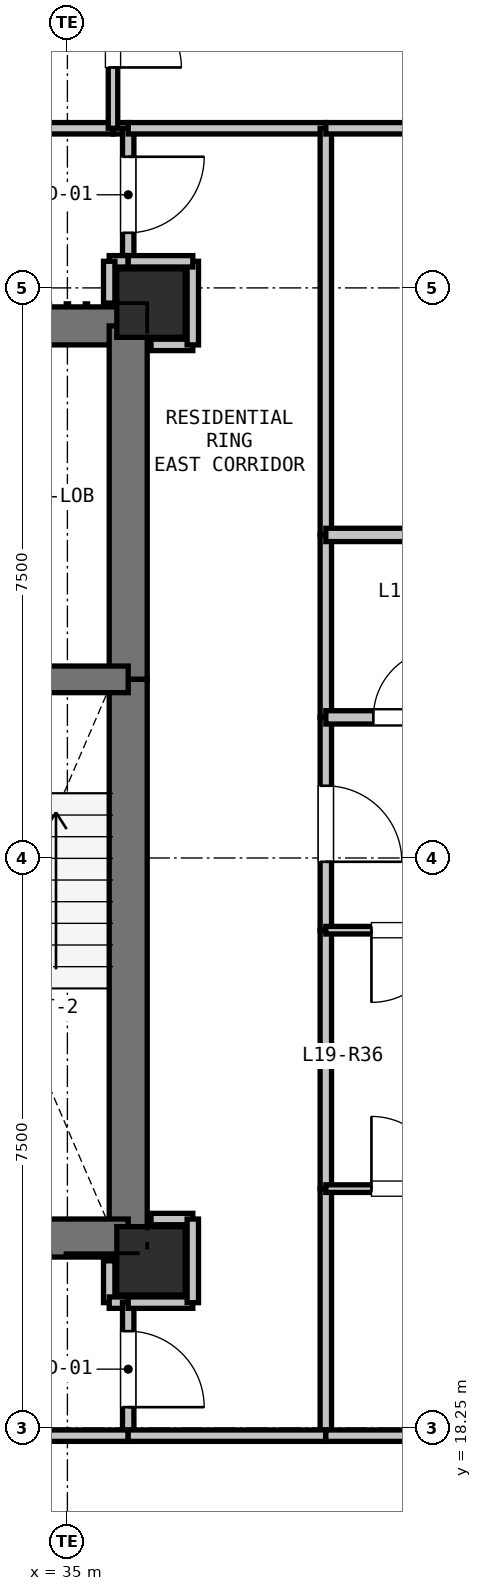
"""IFC4 building model, lengths in metres.
Left out: names, types, materials, properties, quantities, classifications, styles, units other than length and angle.
Written with IfcOpenShell. Run it as: python <this file> out.ifc"""

import sys

from ifc_helpers import new_model, si_unit, direction, frame, frame_2d, origin, origin_2d, place, context, subcontext, project, spatial, rectangle, extrude, element, fill, save


model = new_model("IFC4")
c1 = context("Model", 3, precision=1e-05, world=origin(), true_north=direction((0.0, 1.0)))
c2 = subcontext(c1, "Body", "Model", "MODEL_VIEW")
j1 = project(units=[si_unit("LENGTHUNIT", "METRE"), si_unit("PLANEANGLEUNIT", "RADIAN")], contexts=[c1])
p1 = place(None, origin())
s1 = spatial("IfcSite", under=j1, at=p1, CompositionType="ELEMENT")
p2 = place(p1, origin())
s2 = spatial("IfcBuilding", under=s1, at=p2, CompositionType="ELEMENT")
p3 = place(p2, frame((0.0, 0.0, 73.5)))
s3 = spatial("IfcBuildingStorey", under=s2, at=p3, CompositionType="ELEMENT", Elevation=73.5)
for number, where, z_axis, x_axis in (
    (1, (36.1, 33.05, 0.0), (0.0, 0.0, 1.0), (1.0, 0.0, 0.0)),
    (2, (36.1, 20.45, 0.0), (0.0, 0.0, 1.0), (1.0, 0.0, 0.0)),
):
    element("IfcColumn", number, at=place(p3, frame(where, z_axis=z_axis, x_axis=x_axis)), inside=s3, PredefinedType="COLUMN", context=c2, shape_type="SweptSolid", body=[
        extrude(rectangle(XDim=0.9, YDim=0.9, at=origin_2d()), origin(), (0.0, 0.0, 1.0), 3.3),
    ])
p4 = place(p3, frame((32.35, 32.75, 0.0), z_axis=(0.0, 0.0, 1.0), x_axis=(1.0, 0.0, 0.0)))
e3 = element("IfcWall", 3, at=p4, inside=s3, PredefinedType="SHEAR", context=c2, shape_type="SweptSolid", body=[
    extrude(rectangle(XDim=3.45, YDim=0.5, at=frame_2d((1.725, 0.0))), origin(), (0.0, 0.0, 1.0), 3.05),
])
p5 = place(p4, frame((0.65, 0.0, 0.0)))
e4 = element("IfcOpeningElement", 4, at=p5, cuts=e3, PredefinedType="OPENING", context=c2, shape_type="SweptSolid", body=[
    extrude(rectangle(XDim=1.15, YDim=2.15, at=frame_2d((0.575, 1.075))), frame((0.0, 0.26, 0.0), z_axis=(0.0, -1.0, 0.0), x_axis=(1.0, 0.0, 0.0)), (0.0, 0.0, 1.0), 0.52),
])
p6 = place(p3, frame((35.8, 32.75, 0.0), z_axis=(0.0, 0.0, 1.0), x_axis=(0.0, -1.0, 0.0)))
e5 = element("IfcWall", 5, at=p6, inside=s3, PredefinedType="SHEAR", context=c2, shape_type="SweptSolid", body=[
    extrude(rectangle(XDim=4.65, YDim=0.5, at=frame_2d((2.325, 0.0))), origin(), (0.0, 0.0, 1.0), 3.05),
])
p7 = place(p3, frame((35.8, 28.1, 0.0), z_axis=(0.0, 0.0, 1.0), x_axis=(0.0, -1.0, 0.0)))
e6 = element("IfcWall", 6, at=p7, inside=s3, PredefinedType="SHEAR", context=c2, shape_type="SweptSolid", body=[
    extrude(rectangle(XDim=7.35, YDim=0.5, at=frame_2d((3.675, 0.0))), origin(), (0.0, 0.0, 1.0), 3.05),
])
p8 = place(p3, frame((35.8, 20.75, 0.0), z_axis=(0.0, 0.0, 1.0), x_axis=(-1.0, 0.0, 0.0)))
e7 = element("IfcWall", 7, at=p8, inside=s3, PredefinedType="SHEAR", context=c2, shape_type="SweptSolid", body=[
    extrude(rectangle(XDim=3.45, YDim=0.5, at=frame_2d((1.725, 0.0))), origin(), (0.0, 0.0, 1.0), 3.05),
])
p9 = place(p3, frame((32.35, 28.1, 0.0), z_axis=(0.0, 0.0, 1.0), x_axis=(1.0, 0.0, 0.0)))
e8 = element("IfcWall", 8, at=p9, inside=s3, PredefinedType="SHEAR", context=c2, shape_type="SweptSolid", body=[
    extrude(rectangle(XDim=3.45, YDim=0.35, at=frame_2d((1.725, 0.0))), origin(), (0.0, 0.0, 1.0), 3.05),
])
p10 = place(p9, frame((1.15, 0.0, 0.0)))
e9 = element("IfcOpeningElement", 9, at=p10, cuts=e8, PredefinedType="OPENING", context=c2, shape_type="SweptSolid", body=[
    extrude(rectangle(XDim=1.15, YDim=2.15, at=frame_2d((0.575, 1.075))), frame((0.0, 0.185, 0.0), z_axis=(0.0, -1.0, 0.0), x_axis=(1.0, 0.0, 0.0)), (0.0, 0.0, 1.0), 0.37),
])
p11 = place(p3, frame((35.55, 20.45, 0.0), z_axis=(0.0, 0.0, 1.0), x_axis=(0.0, -1.0, 0.0)))
e10 = element("IfcWall", 10, at=p11, inside=s3, PredefinedType="PARTITIONING", context=c2, shape_type="SweptSolid", body=[
    extrude(rectangle(XDim=0.55, YDim=0.15, at=frame_2d((0.275, 0.0))), origin(), (0.0, 0.0, 1.0), 2.498),
])
p12 = place(p3, frame((35.55, 19.9, 0.0), z_axis=(0.0, 0.0, 1.0), x_axis=(1.0, 0.0, 0.0)))
e11 = element("IfcWall", 11, at=p12, inside=s3, PredefinedType="PARTITIONING", context=c2, shape_type="SweptSolid", body=[
    extrude(rectangle(XDim=0.25, YDim=0.15, at=frame_2d((0.125, 0.0))), origin(), (0.0, 0.0, 1.0), 3.05),
])
p13 = place(p3, frame((35.8, 19.9, 0.0), z_axis=(0.0, 0.0, 1.0), x_axis=(0.0, -1.0, 0.0)))
e12 = element("IfcWall", 12, at=p13, inside=s3, PredefinedType="PARTITIONING", context=c2, shape_type="SweptSolid", body=[
    extrude(rectangle(XDim=1.75, YDim=0.15, at=frame_2d((0.875, 0.0))), origin(), (0.0, 0.0, 1.0), 3.05),
])
p14 = place(p13, frame((0.375, 0.0, 0.0)))
e13 = element("IfcOpeningElement", 13, at=p14, cuts=e12, PredefinedType="OPENING", context=c2, shape_type="SweptSolid", body=[
    extrude(rectangle(XDim=1.0, YDim=2.15, at=frame_2d((0.5, 1.075))), frame((0.0, 0.085, 0.0), z_axis=(0.0, -1.0, 0.0), x_axis=(1.0, 0.0, 0.0)), (0.0, 0.0, 1.0), 0.17),
])
p15 = place(p3, frame((35.8, 18.15, 0.0), z_axis=(0.0, 0.0, 1.0), x_axis=(-1.0, 0.0, 0.0)))
e14 = element("IfcWall", 14, at=p15, inside=s3, PredefinedType="PARTITIONING", context=c2, shape_type="SweptSolid", body=[
    extrude(rectangle(XDim=2.2, YDim=0.15, at=frame_2d((1.1, 0.0))), origin(), (0.0, 0.0, 1.0), 3.05),
])
p16 = place(p3, frame((32.0, 35.35, 0.0), z_axis=(0.0, 0.0, 1.0), x_axis=(1.0, 0.0, 0.0)))
e15 = element("IfcWall", 15, at=p16, inside=s3, PredefinedType="PARTITIONING", context=c2, shape_type="SweptSolid", body=[
    extrude(rectangle(XDim=3.6, YDim=0.15, at=frame_2d((1.8, 0.0))), origin(), (0.0, 0.0, 1.0), 3.05),
])
p17 = place(p3, frame((35.6, 35.35, 0.0), z_axis=(0.0, 0.0, 1.0), x_axis=(1.0, 0.0, 0.0)))
e16 = element("IfcWall", 16, at=p17, inside=s3, PredefinedType="PARTITIONING", context=c2, shape_type="SweptSolid", body=[
    extrude(rectangle(XDim=0.2, YDim=0.15, at=frame_2d((0.1, 0.0))), origin(), (0.0, 0.0, 1.0), 3.05),
])
p18 = place(p3, frame((35.8, 35.35, 0.0), z_axis=(0.0, 0.0, 1.0), x_axis=(0.0, -1.0, 0.0)))
e17 = element("IfcWall", 17, at=p18, inside=s3, PredefinedType="PARTITIONING", context=c2, shape_type="SweptSolid", body=[
    extrude(rectangle(XDim=1.75, YDim=0.15, at=frame_2d((0.875, 0.0))), origin(), (0.0, 0.0, 1.0), 3.05),
])
p19 = place(p18, frame((0.375, 0.0, 0.0)))
e18 = element("IfcOpeningElement", 18, at=p19, cuts=e17, PredefinedType="OPENING", context=c2, shape_type="SweptSolid", body=[
    extrude(rectangle(XDim=1.0, YDim=2.15, at=frame_2d((0.5, 1.075))), frame((0.0, 0.085, 0.0), z_axis=(0.0, -1.0, 0.0), x_axis=(1.0, 0.0, 0.0)), (0.0, 0.0, 1.0), 0.17),
])
p20 = place(p3, frame((35.8, 33.6, 0.0), z_axis=(0.0, 0.0, 1.0), x_axis=(-1.0, 0.0, 0.0)))
e19 = element("IfcWall", 19, at=p20, inside=s3, PredefinedType="PARTITIONING", context=c2, shape_type="SweptSolid", body=[
    extrude(rectangle(XDim=0.25, YDim=0.15, at=frame_2d((0.125, 0.0))), origin(), (0.0, 0.0, 1.0), 3.05),
])
p21 = place(p3, frame((35.55, 33.6, 0.0), z_axis=(0.0, 0.0, 1.0), x_axis=(0.0, -1.0, 0.0)))
e20 = element("IfcWall", 20, at=p21, inside=s3, PredefinedType="PARTITIONING", context=c2, shape_type="SweptSolid", body=[
    extrude(rectangle(XDim=0.55, YDim=0.15, at=frame_2d((0.275, 0.0))), origin(), (0.0, 0.0, 1.0), 2.498),
])
for number, where, z_axis, x_axis in (
    (21, (36.65, 21.0, 0.0), (0.0, 0.0, 1.0), (-1.0, 0.0, 0.0)),
    (22, (36.1, 32.5, 0.0), (0.0, 0.0, 1.0), (1.0, 0.0, 0.0)),
):
    element("IfcWall", number, at=place(p3, frame(where, z_axis=z_axis, x_axis=x_axis)), inside=s3, PredefinedType="PARTITIONING", context=c2, shape_type="SweptSolid", body=[
        extrude(rectangle(XDim=0.55, YDim=0.15, at=frame_2d((0.275, 0.0))), origin(), (0.0, 0.0, 1.0), 2.498),
    ])
p22 = place(p3, frame((36.65, 32.5, 0.0), z_axis=(0.0, 0.0, 1.0), x_axis=(0.0, 1.0, 0.0)))
e23 = element("IfcWall", 23, at=p22, inside=s3, PredefinedType="PARTITIONING", context=c2, shape_type="SweptSolid", body=[
    extrude(rectangle(XDim=1.1, YDim=0.15, at=frame_2d((0.55, 0.0))), origin(), (0.0, 0.0, 1.0), 2.423),
])
p23 = place(p3, frame((36.65, 33.6, 0.0), z_axis=(0.0, 0.0, 1.0), x_axis=(-1.0, 0.0, 0.0)))
e24 = element("IfcWall", 24, at=p23, inside=s3, PredefinedType="PARTITIONING", context=c2, shape_type="SweptSolid", body=[
    extrude(rectangle(XDim=0.85, YDim=0.15, at=frame_2d((0.425, 0.0))), origin(), (0.0, 0.0, 1.0), 2.423),
])
p24 = place(p3, frame((35.8, 35.35, 0.0), z_axis=(0.0, 0.0, 1.0), x_axis=(1.0, 0.0, 0.0)))
e25 = element("IfcWall", 25, at=p24, inside=s3, PredefinedType="PARTITIONING", context=c2, shape_type="SweptSolid", body=[
    extrude(rectangle(XDim=2.6, YDim=0.15, at=frame_2d((1.3, 0.0))), origin(), (0.0, 0.0, 1.0), 2.423),
])
p25 = place(p3, frame((38.4, 35.35, 0.0), z_axis=(0.0, 0.0, 1.0), x_axis=(0.0, -1.0, 0.0)))
e26 = element("IfcWall", 26, at=p25, inside=s3, PredefinedType="PARTITIONING", context=c2, shape_type="SweptSolid", body=[
    extrude(rectangle(XDim=5.35, YDim=0.15, at=frame_2d((2.675, 0.0))), origin(), (0.0, 0.0, 1.0), 3.05),
])
p26 = place(p3, frame((38.4, 30.0, 0.0), z_axis=(0.0, 0.0, 1.0), x_axis=(0.0, -1.0, 0.0)))
e27 = element("IfcWall", 27, at=p26, inside=s3, PredefinedType="PARTITIONING", context=c2, shape_type="SweptSolid", body=[
    extrude(rectangle(XDim=2.4, YDim=0.15, at=frame_2d((1.2, 0.0))), origin(), (0.0, 0.0, 1.0), 3.05),
])
p27 = place(p3, frame((38.4, 27.6, 0.0), z_axis=(0.0, 0.0, 1.0), x_axis=(0.0, -1.0, 0.0)))
e28 = element("IfcWall", 28, at=p27, inside=s3, PredefinedType="PARTITIONING", context=c2, shape_type="SweptSolid", body=[
    extrude(rectangle(XDim=2.8, YDim=0.15, at=frame_2d((1.4, 0.0))), origin(), (0.0, 0.0, 1.0), 3.05),
])
p28 = place(p27, frame((0.9, 0.0, 0.0)))
e29 = element("IfcOpeningElement", 29, at=p28, cuts=e28, PredefinedType="OPENING", context=c2, shape_type="SweptSolid", body=[
    extrude(rectangle(XDim=1.0, YDim=2.15, at=frame_2d((0.5, 1.075))), frame((0.0, 0.085, 0.0), z_axis=(0.0, -1.0, 0.0), x_axis=(1.0, 0.0, 0.0)), (0.0, 0.0, 1.0), 0.17),
])
p29 = place(p3, frame((38.4, 24.8, 0.0), z_axis=(0.0, 0.0, 1.0), x_axis=(0.0, -1.0, 0.0)))
e30 = element("IfcWall", 30, at=p29, inside=s3, PredefinedType="PARTITIONING", context=c2, shape_type="SweptSolid", body=[
    extrude(rectangle(XDim=3.4, YDim=0.15, at=frame_2d((1.7, 0.0))), origin(), (0.0, 0.0, 1.0), 3.05),
])
p30 = place(p3, frame((38.4, 21.4, 0.0), z_axis=(0.0, 0.0, 1.0), x_axis=(0.0, -1.0, 0.0)))
e31 = element("IfcWall", 31, at=p30, inside=s3, PredefinedType="PARTITIONING", context=c2, shape_type="SweptSolid", body=[
    extrude(rectangle(XDim=3.25, YDim=0.15, at=frame_2d((1.625, 0.0))), origin(), (0.0, 0.0, 1.0), 3.05),
])
p31 = place(p3, frame((38.4, 18.15, 0.0), z_axis=(0.0, 0.0, 1.0), x_axis=(-1.0, 0.0, 0.0)))
e32 = element("IfcWall", 32, at=p31, inside=s3, PredefinedType="PARTITIONING", context=c2, shape_type="SweptSolid", body=[
    extrude(rectangle(XDim=2.6, YDim=0.15, at=frame_2d((1.3, 0.0))), origin(), (0.0, 0.0, 1.0), 2.423),
])
p32 = place(p3, frame((35.8, 19.9, 0.0), z_axis=(0.0, 0.0, 1.0), x_axis=(1.0, 0.0, 0.0)))
e33 = element("IfcWall", 33, at=p32, inside=s3, PredefinedType="PARTITIONING", context=c2, shape_type="SweptSolid", body=[
    extrude(rectangle(XDim=0.85, YDim=0.15, at=frame_2d((0.425, 0.0))), origin(), (0.0, 0.0, 1.0), 2.423),
])
p33 = place(p3, frame((36.65, 19.9, 0.0), z_axis=(0.0, 0.0, 1.0), x_axis=(0.0, 1.0, 0.0)))
e34 = element("IfcWall", 34, at=p33, inside=s3, PredefinedType="PARTITIONING", context=c2, shape_type="SweptSolid", body=[
    extrude(rectangle(XDim=1.1, YDim=0.15, at=frame_2d((0.55, 0.0))), origin(), (0.0, 0.0, 1.0), 3.05),
])
p34 = place(p3, frame((40.55, 24.8, 0.0), z_axis=(0.0, 0.0, 1.0), x_axis=(-1.0, 0.0, 0.0)))
e35 = element("IfcWall", 35, at=p34, inside=s3, PredefinedType="PARTITIONING", context=c2, shape_type="SweptSolid", body=[
    extrude(rectangle(XDim=2.15, YDim=0.1, at=frame_2d((1.075, 0.0))), origin(), (0.0, 0.0, 1.0), 3.05),
])
p35 = place(p34, frame((0.6, 0.0, 0.0)))
e36 = element("IfcOpeningElement", 36, at=p35, cuts=e35, PredefinedType="OPENING", context=c2, shape_type="SweptSolid", body=[
    extrude(rectangle(XDim=0.95, YDim=2.1, at=frame_2d((0.475, 1.05))), frame((0.0, 0.06, 0.0), z_axis=(0.0, -1.0, 0.0), x_axis=(1.0, 0.0, 0.0)), (0.0, 0.0, 1.0), 0.12),
])
p36 = place(p3, frame((38.4, 27.6, 0.0), z_axis=(0.0, 0.0, 1.0), x_axis=(1.0, 0.0, 0.0)))
e37 = element("IfcWall", 37, at=p36, inside=s3, PredefinedType="PLUMBINGWALL", context=c2, shape_type="SweptSolid", body=[
    extrude(rectangle(XDim=2.15, YDim=0.175, at=frame_2d((1.075, 0.0))), origin(), (0.0, 0.0, 1.0), 3.05),
])
p37 = place(p36, frame((0.625, 0.0, 0.0)))
e38 = element("IfcOpeningElement", 38, at=p37, cuts=e37, PredefinedType="OPENING", context=c2, shape_type="SweptSolid", body=[
    extrude(rectangle(XDim=0.9, YDim=2.1, at=frame_2d((0.45, 1.05))), frame((0.0, 0.097, 0.0), z_axis=(0.0, -1.0, 0.0), x_axis=(1.0, 0.0, 0.0)), (0.0, 0.0, 1.0), 0.195),
])
p38 = place(p3, frame((35.6, 37.85, 0.0), z_axis=(0.0, 0.0, 1.0), x_axis=(0.0, -1.0, 0.0)))
e39 = element("IfcWall", 39, at=p38, inside=s3, PredefinedType="PARTITIONING", context=c2, shape_type="SweptSolid", body=[
    extrude(rectangle(XDim=2.5, YDim=0.125, at=frame_2d((1.25, 0.0))), origin(), (0.0, 0.0, 1.0), 3.05),
])
p39 = place(p38, frame((0.8, 0.0, 0.0)))
e40 = element("IfcOpeningElement", 40, at=p39, cuts=e39, PredefinedType="OPENING", context=c2, shape_type="SweptSolid", body=[
    extrude(rectangle(XDim=0.9, YDim=2.1, at=frame_2d((0.45, 1.05))), frame((0.0, 0.073, 0.0), z_axis=(0.0, -1.0, 0.0), x_axis=(1.0, 0.0, 0.0)), (0.0, 0.0, 1.0), 0.145),
])
p40 = place(p3, frame((38.4, 18.15, 0.0), z_axis=(0.0, 0.0, 1.0), x_axis=(1.0, 0.0, 0.0)))
e41 = element("IfcWall", 41, at=p40, inside=s3, PredefinedType="PARTITIONING", context=c2, shape_type="SweptSolid", body=[
    extrude(rectangle(XDim=4.473, YDim=0.15, at=frame_2d((2.237, 0.0))), origin(), (0.0, 0.0, 1.0), 2.365),
])
p41 = place(p3, frame((38.4, 30.0, 0.0), z_axis=(0.0, 0.0, 1.0), x_axis=(1.0, 0.0, 0.0)))
e42 = element("IfcWall", 42, at=p41, inside=s3, PredefinedType="PLUMBINGWALL", context=c2, shape_type="SweptSolid", body=[
    extrude(rectangle(XDim=2.15, YDim=0.175, at=frame_2d((1.075, 0.0))), origin(), (0.0, 0.0, 1.0), 3.05),
])
p42 = place(p3, frame((38.4, 21.4, 0.0), z_axis=(0.0, 0.0, 1.0), x_axis=(1.0, 0.0, 0.0)))
e43 = element("IfcWall", 43, at=p42, inside=s3, PredefinedType="PARTITIONING", context=c2, shape_type="SweptSolid", body=[
    extrude(rectangle(XDim=2.15, YDim=0.1, at=frame_2d((1.075, 0.0))), origin(), (0.0, 0.0, 1.0), 3.05),
])
p43 = place(p42, frame((0.6, 0.0, 0.0)))
e44 = element("IfcOpeningElement", 44, at=p43, cuts=e43, PredefinedType="OPENING", context=c2, shape_type="SweptSolid", body=[
    extrude(rectangle(XDim=0.95, YDim=2.1, at=frame_2d((0.475, 1.05))), frame((0.0, 0.06, 0.0), z_axis=(0.0, -1.0, 0.0), x_axis=(1.0, 0.0, 0.0)), (0.0, 0.0, 1.0), 0.12),
])
p44 = place(p3, frame((42.873, 35.35, 0.0), z_axis=(0.0, 0.0, 1.0), x_axis=(-1.0, 0.0, 0.0)))
e45 = element("IfcWall", 45, at=p44, inside=s3, PredefinedType="PARTITIONING", context=c2, shape_type="SweptSolid", body=[
    extrude(rectangle(XDim=4.473, YDim=0.15, at=frame_2d((2.237, 0.0))), origin(), (0.0, 0.0, 1.0), 2.365),
])
p45 = place(p14, origin())
e46 = element("IfcDoor", 46, at=p45, inside=s3, OperationType="SINGLE_SWING_RIGHT", PredefinedType="DOOR", context=c2, shape_type="SweptSolid", body=[
    extrude(rectangle(XDim=1.0, YDim=2.15, at=frame_2d((0.5, 1.075))), frame((0.0, 0.025, 0.0), z_axis=(0.0, -1.0, 0.0), x_axis=(1.0, 0.0, 0.0)), (0.0, 0.0, 1.0), 0.05),
])
fill(e13, e46)
p46 = place(p19, origin())
e47 = element("IfcDoor", 47, at=p46, inside=s3, OperationType="SINGLE_SWING_LEFT", PredefinedType="DOOR", context=c2, shape_type="SweptSolid", body=[
    extrude(rectangle(XDim=1.0, YDim=2.15, at=frame_2d((0.5, 1.075))), frame((0.0, 0.025, 0.0), z_axis=(0.0, -1.0, 0.0), x_axis=(1.0, 0.0, 0.0)), (0.0, 0.0, 1.0), 0.05),
])
fill(e18, e47)
p47 = place(p28, origin())
e48 = element("IfcDoor", 48, at=p47, inside=s3, OperationType="SINGLE_SWING_RIGHT", PredefinedType="DOOR", context=c2, shape_type="SweptSolid", body=[
    extrude(rectangle(XDim=1.0, YDim=2.15, at=frame_2d((0.5, 1.075))), frame((0.0, 0.025, 0.0), z_axis=(0.0, -1.0, 0.0), x_axis=(1.0, 0.0, 0.0)), (0.0, 0.0, 1.0), 0.05),
])
fill(e29, e48)
p48 = place(p37, origin())
e49 = element("IfcDoor", 49, at=p48, inside=s3, OperationType="SINGLE_SWING_RIGHT", PredefinedType="DOOR", context=c2, shape_type="SweptSolid", body=[
    extrude(rectangle(XDim=0.9, YDim=2.1, at=frame_2d((0.45, 1.05))), frame((0.0, 0.025, 0.0), z_axis=(0.0, -1.0, 0.0), x_axis=(1.0, 0.0, 0.0)), (0.0, 0.0, 1.0), 0.05),
])
fill(e38, e49)
p49 = place(p35, origin())
e50 = element("IfcDoor", 50, at=p49, inside=s3, OperationType="SINGLE_SWING_RIGHT", PredefinedType="DOOR", context=c2, shape_type="SweptSolid", body=[
    extrude(rectangle(XDim=0.95, YDim=2.1, at=frame_2d((0.475, 1.05))), frame((0.0, 0.025, 0.0), z_axis=(0.0, -1.0, 0.0), x_axis=(1.0, 0.0, 0.0)), (0.0, 0.0, 1.0), 0.05),
])
fill(e36, e50)
p50 = place(p43, origin())
e51 = element("IfcDoor", 51, at=p50, inside=s3, OperationType="SINGLE_SWING_LEFT", PredefinedType="DOOR", context=c2, shape_type="SweptSolid", body=[
    extrude(rectangle(XDim=0.95, YDim=2.1, at=frame_2d((0.475, 1.05))), frame((0.0, 0.025, 0.0), z_axis=(0.0, -1.0, 0.0), x_axis=(1.0, 0.0, 0.0)), (0.0, 0.0, 1.0), 0.05),
])
fill(e44, e51)
p51 = place(p39, origin())
e52 = element("IfcDoor", 52, at=p51, inside=s3, OperationType="SINGLE_SWING_RIGHT", PredefinedType="DOOR", context=c2, shape_type="SweptSolid", body=[
    extrude(rectangle(XDim=0.9, YDim=2.1, at=frame_2d((0.45, 1.05))), frame((0.0, 0.025, 0.0), z_axis=(0.0, -1.0, 0.0), x_axis=(1.0, 0.0, 0.0)), (0.0, 0.0, 1.0), 0.05),
])
fill(e40, e52)
save(model, sys.argv[1])
